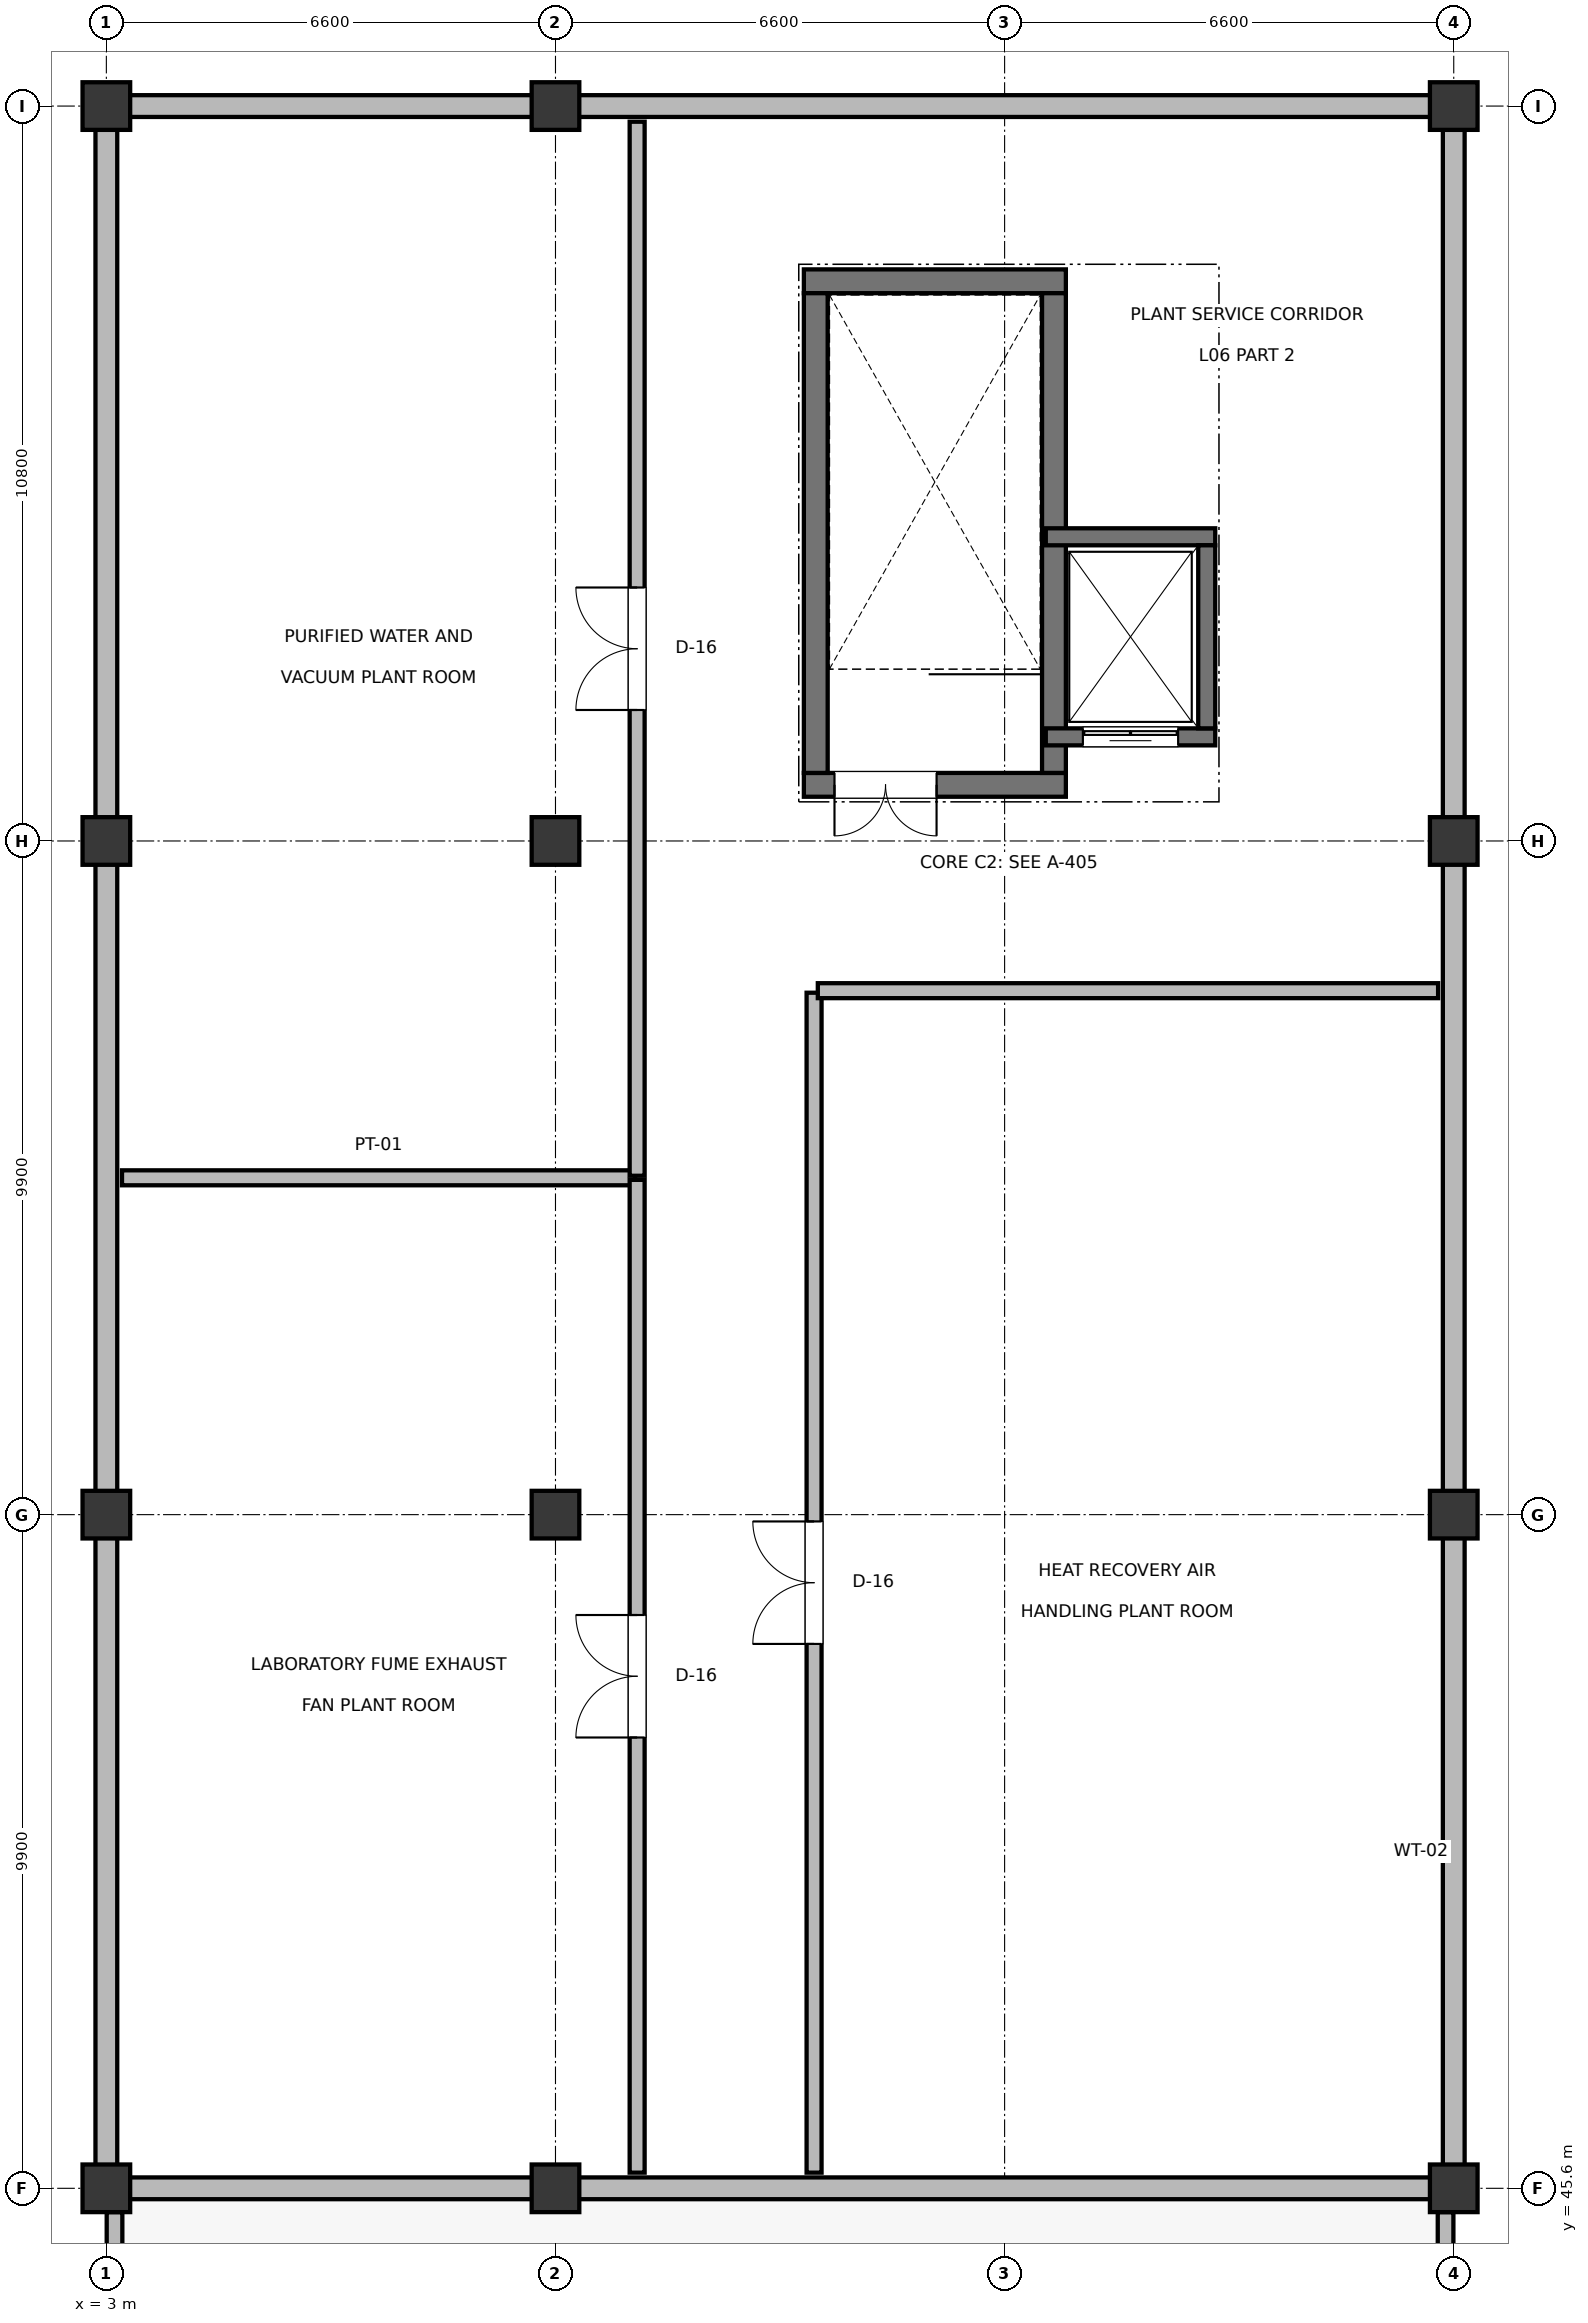
"""IFC4 building model, lengths in metres.
Left out: names, types, materials, properties, quantities, classifications, styles, units other than length and angle.
Written with IfcOpenShell. Run it as: python <this file> out.ifc"""

import sys

from ifc_helpers import new_model, si_unit, direction, frame, frame_2d, origin, origin_2d, place, context, subcontext, project, spatial, rectangle, extrude, element, fill, save


model = new_model("IFC4")
c1 = context("Model", 3, precision=1e-05, world=origin(), true_north=direction((0.0, 1.0)))
c2 = subcontext(c1, "Body", "Model", "MODEL_VIEW")
j1 = project(units=[si_unit("LENGTHUNIT", "METRE"), si_unit("PLANEANGLEUNIT", "RADIAN")], contexts=[c1])
p1 = place(None, origin())
s1 = spatial("IfcSite", under=j1, at=p1, CompositionType="ELEMENT")
p2 = place(p1, origin())
s2 = spatial("IfcBuilding", under=s1, at=p2, CompositionType="ELEMENT")
p3 = place(p2, frame((0.0, 0.0, 28.5)))
s3 = spatial("IfcBuildingStorey", under=s2, at=p3, CompositionType="ELEMENT", Elevation=28.5)
for number, where, z_axis, x_axis in (
    (1, (3.0, 45.6, 0.0), (0.0, 0.0, 1.0), (1.0, 0.0, 0.0)),
    (2, (3.0, 55.5, 0.0), (0.0, 0.0, 1.0), (1.0, 0.0, 0.0)),
    (3, (3.0, 65.4, 0.0), (0.0, 0.0, 1.0), (1.0, 0.0, 0.0)),
    (4, (3.0, 76.2, 0.0), (0.0, 0.0, 1.0), (1.0, 0.0, 0.0)),
    (5, (9.6, 45.6, 0.0), (0.0, 0.0, 1.0), (1.0, 0.0, 0.0)),
    (6, (9.6, 55.5, 0.0), (0.0, 0.0, 1.0), (1.0, 0.0, 0.0)),
    (7, (9.6, 65.4, 0.0), (0.0, 0.0, 1.0), (1.0, 0.0, 0.0)),
    (8, (9.6, 76.2, 0.0), (0.0, 0.0, 1.0), (1.0, 0.0, 0.0)),
    (9, (22.8, 45.6, 0.0), (0.0, 0.0, 1.0), (1.0, 0.0, 0.0)),
    (10, (22.8, 55.5, 0.0), (0.0, 0.0, 1.0), (1.0, 0.0, 0.0)),
    (11, (22.8, 65.4, 0.0), (0.0, 0.0, 1.0), (1.0, 0.0, 0.0)),
    (12, (22.8, 76.2, 0.0), (0.0, 0.0, 1.0), (1.0, 0.0, 0.0)),
):
    element("IfcColumn", number, at=place(p3, frame(where, z_axis=z_axis, x_axis=x_axis)), inside=s3, PredefinedType="COLUMN", context=c2, shape_type="SweptSolid", body=[
        extrude(rectangle(XDim=0.7, YDim=0.7, at=origin_2d()), origin(), (0.0, 0.0, 1.0), 4.5),
    ])
for number, where, z_axis, x_axis in (
    (13, (3.0, 45.935, 0.0), (0.0, 0.0, 1.0), (0.0, 1.0, 0.0)),
    (14, (3.0, 55.835, 0.0), (0.0, 0.0, 1.0), (0.0, 1.0, 0.0)),
):
    element("IfcWall", number, at=place(p3, frame(where, z_axis=z_axis, x_axis=x_axis)), inside=s3, PredefinedType="SOLIDWALL", context=c2, shape_type="SweptSolid", body=[
        extrude(rectangle(XDim=9.23, YDim=0.32, at=frame_2d((4.615, 0.0))), origin(), (0.0, 0.0, 1.0), 3.545),
    ])
p4 = place(p3, frame((3.0, 65.735, 0.0), z_axis=(0.0, 0.0, 1.0), x_axis=(0.0, 1.0, 0.0)))
e15 = element("IfcWall", 15, at=p4, inside=s3, PredefinedType="SOLIDWALL", context=c2, shape_type="SweptSolid", body=[
    extrude(rectangle(XDim=10.13, YDim=0.32, at=frame_2d((5.065, 0.0))), origin(), (0.0, 0.0, 1.0), 3.545),
])
for number, where, z_axis, x_axis in (
    (16, (22.8, 45.935, 0.0), (0.0, 0.0, 1.0), (0.0, 1.0, 0.0)),
    (17, (22.8, 55.835, 0.0), (0.0, 0.0, 1.0), (0.0, 1.0, 0.0)),
):
    element("IfcWall", number, at=place(p3, frame(where, z_axis=z_axis, x_axis=x_axis)), inside=s3, PredefinedType="SOLIDWALL", context=c2, shape_type="SweptSolid", body=[
        extrude(rectangle(XDim=9.23, YDim=0.32, at=frame_2d((4.615, 0.0))), origin(), (0.0, 0.0, 1.0), 3.395),
    ])
p5 = place(p3, frame((22.8, 65.735, 0.0), z_axis=(0.0, 0.0, 1.0), x_axis=(0.0, 1.0, 0.0)))
e18 = element("IfcWall", 18, at=p5, inside=s3, PredefinedType="SOLIDWALL", context=c2, shape_type="SweptSolid", body=[
    extrude(rectangle(XDim=10.13, YDim=0.32, at=frame_2d((5.065, 0.0))), origin(), (0.0, 0.0, 1.0), 3.395),
])
p6 = place(p3, frame((3.335, 76.2, 0.0), z_axis=(0.0, 0.0, 1.0), x_axis=(1.0, 0.0, 0.0)))
e19 = element("IfcWall", 19, at=p6, inside=s3, PredefinedType="SOLIDWALL", context=c2, shape_type="SweptSolid", body=[
    extrude(rectangle(XDim=19.13, YDim=0.32, at=frame_2d((9.565, 0.0))), origin(), (0.0, 0.0, 1.0), 3.425),
])
p7 = place(p3, frame((3.335, 45.6, 0.0), z_axis=(0.0, 0.0, 1.0), x_axis=(1.0, 0.0, 0.0)))
e20 = element("IfcWall", 20, at=p7, inside=s3, PredefinedType="SOLIDWALL", context=c2, shape_type="SweptSolid", body=[
    extrude(rectangle(XDim=19.13, YDim=0.32, at=frame_2d((9.565, 0.0))), origin(), (0.0, 0.0, 1.0), 3.445),
])
for number, where, z_axis, x_axis in (
    (21, (3.12, 30.35, 0.0), (0.0, 0.0, 1.0), (0.0, 1.0, 0.0)),
    (22, (22.68, 30.35, 0.0), (0.0, 0.0, 1.0), (0.0, 1.0, 0.0)),
):
    element("IfcWall", number, at=place(p3, frame(where, z_axis=z_axis, x_axis=x_axis)), inside=s3, PredefinedType="PARAPET", context=c2, shape_type="SweptSolid", body=[
        extrude(rectangle(XDim=14.9, YDim=0.23, at=frame_2d((7.45, 0.0))), origin(), (0.0, 0.0, 1.0), 1.05),
    ])
p8 = place(p3, frame((13.25, 66.225, 0.0), z_axis=(0.0, 0.0, 1.0), x_axis=(1.0, 0.0, 0.0)))
e23 = element("IfcWall", 23, at=p8, inside=s3, PredefinedType="SHEAR", context=c2, shape_type="SweptSolid", body=[
    extrude(rectangle(XDim=3.85, YDim=0.35, at=frame_2d((1.925, 0.0))), origin(), (0.0, 0.0, 1.0), 4.28),
])
p9 = place(p8, frame((0.45, 0.0, 0.0)))
e24 = element("IfcOpeningElement", 24, at=p9, cuts=e23, PredefinedType="OPENING", context=c2, shape_type="SweptSolid", body=[
    extrude(rectangle(XDim=1.5, YDim=2.2, at=frame_2d((0.75, 1.1))), frame((0.0, 0.185, 0.0), z_axis=(0.0, -1.0, 0.0), x_axis=(1.0, 0.0, 0.0)), (0.0, 0.0, 1.0), 0.37),
])
p10 = place(p3, frame((13.25, 73.625, 0.0), z_axis=(0.0, 0.0, 1.0), x_axis=(1.0, 0.0, 0.0)))
e25 = element("IfcWall", 25, at=p10, inside=s3, PredefinedType="SHEAR", context=c2, shape_type="SweptSolid", body=[
    extrude(rectangle(XDim=3.85, YDim=0.35, at=frame_2d((1.925, 0.0))), origin(), (0.0, 0.0, 1.0), 4.28),
])
for number, where, z_axis, x_axis in (
    (26, (13.425, 66.4, 0.0), (0.0, 0.0, 1.0), (0.0, 1.0, 0.0)),
    (27, (16.925, 66.4, 0.0), (0.0, 0.0, 1.0), (0.0, 1.0, 0.0)),
):
    element("IfcWall", number, at=place(p3, frame(where, z_axis=z_axis, x_axis=x_axis)), inside=s3, PredefinedType="SHEAR", context=c2, shape_type="SweptSolid", body=[
        extrude(rectangle(XDim=7.05, YDim=0.35, at=frame_2d((3.525, 0.0))), origin(), (0.0, 0.0, 1.0), 4.28),
    ])
p11 = place(p3, frame((16.805, 66.93, 0.0), z_axis=(0.0, 0.0, 1.0), x_axis=(1.0, 0.0, 0.0)))
e28 = element("IfcWall", 28, at=p11, inside=s3, PredefinedType="SHEAR", context=c2, shape_type="SweptSolid", body=[
    extrude(rectangle(XDim=2.49, YDim=0.25, at=frame_2d((1.245, 0.0))), origin(), (0.0, 0.0, 1.0), 4.26),
])
p12 = place(p11, frame((0.545, 0.0, 0.0)))
e29 = element("IfcOpeningElement", 29, at=p12, cuts=e28, PredefinedType="OPENING", context=c2, shape_type="SweptSolid", body=[
    extrude(rectangle(XDim=1.4, YDim=2.3, at=frame_2d((0.7, 1.15))), frame((0.0, 0.135, 0.0), z_axis=(0.0, -1.0, 0.0), x_axis=(1.0, 0.0, 0.0)), (0.0, 0.0, 1.0), 0.27),
])
p13 = place(p3, frame((16.805, 69.87, 0.0), z_axis=(0.0, 0.0, 1.0), x_axis=(1.0, 0.0, 0.0)))
e30 = element("IfcWall", 30, at=p13, inside=s3, PredefinedType="SHEAR", context=c2, shape_type="SweptSolid", body=[
    extrude(rectangle(XDim=2.49, YDim=0.25, at=frame_2d((1.245, 0.0))), origin(), (0.0, 0.0, 1.0), 4.26),
])
p14 = place(p3, frame((19.17, 67.055, 0.0), z_axis=(0.0, 0.0, 1.0), x_axis=(0.0, 1.0, 0.0)))
e31 = element("IfcWall", 31, at=p14, inside=s3, PredefinedType="SHEAR", context=c2, shape_type="SweptSolid", body=[
    extrude(rectangle(XDim=2.69, YDim=0.25, at=frame_2d((1.345, 0.0))), origin(), (0.0, 0.0, 1.0), 4.26),
])
p15 = place(p3, frame((3.23, 60.45, 0.0), z_axis=(0.0, 0.0, 1.0), x_axis=(1.0, 0.0, 0.0)))
e32 = element("IfcWall", 32, at=p15, inside=s3, PredefinedType="PARTITIONING", context=c2, shape_type="SweptSolid", body=[
    extrude(rectangle(XDim=7.54, YDim=0.22, at=frame_2d((3.77, 0.0))), origin(), (0.0, 0.0, 1.0), 3.395),
])
p16 = place(p3, frame((10.8, 45.83, 0.0), z_axis=(0.0, 0.0, 1.0), x_axis=(0.0, 1.0, 0.0)))
e33 = element("IfcWall", 33, at=p16, inside=s3, PredefinedType="PARTITIONING", context=c2, shape_type="SweptSolid", body=[
    extrude(rectangle(XDim=14.59, YDim=0.22, at=frame_2d((7.295, 0.0))), origin(), (0.0, 0.0, 1.0), 3.445),
])
p17 = place(p16, frame((6.395, 0.0, 0.0)))
e34 = element("IfcOpeningElement", 34, at=p17, cuts=e33, PredefinedType="OPENING", context=c2, shape_type="SweptSolid", body=[
    extrude(rectangle(XDim=1.8, YDim=2.4, at=frame_2d((0.9, 1.2))), frame((0.0, 0.12, 0.0), z_axis=(0.0, -1.0, 0.0), x_axis=(1.0, 0.0, 0.0)), (0.0, 0.0, 1.0), 0.24),
])
p18 = place(p3, frame((13.4, 45.83, 0.0), z_axis=(0.0, 0.0, 1.0), x_axis=(0.0, 1.0, 0.0)))
e35 = element("IfcWall", 35, at=p18, inside=s3, PredefinedType="PARTITIONING", context=c2, shape_type="SweptSolid", body=[
    extrude(rectangle(XDim=17.34, YDim=0.22, at=frame_2d((8.67, 0.0))), origin(), (0.0, 0.0, 1.0), 3.445),
])
p19 = place(p18, frame((7.77, 0.0, 0.0)))
e36 = element("IfcOpeningElement", 36, at=p19, cuts=e35, PredefinedType="OPENING", context=c2, shape_type="SweptSolid", body=[
    extrude(rectangle(XDim=1.8, YDim=2.4, at=frame_2d((0.9, 1.2))), frame((0.0, 0.12, 0.0), z_axis=(0.0, -1.0, 0.0), x_axis=(1.0, 0.0, 0.0)), (0.0, 0.0, 1.0), 0.24),
])
p20 = place(p3, frame((13.455, 63.2, 0.0), z_axis=(0.0, 0.0, 1.0), x_axis=(1.0, 0.0, 0.0)))
e37 = element("IfcWall", 37, at=p20, inside=s3, PredefinedType="PARTITIONING", context=c2, shape_type="SweptSolid", body=[
    extrude(rectangle(XDim=9.115, YDim=0.22, at=frame_2d((4.558, 0.0))), origin(), (0.0, 0.0, 1.0), 3.395),
])
p21 = place(p3, frame((10.8, 60.48, 0.0), z_axis=(0.0, 0.0, 1.0), x_axis=(0.0, 1.0, 0.0)))
e38 = element("IfcWall", 38, at=p21, inside=s3, PredefinedType="PARTITIONING", context=c2, shape_type="SweptSolid", body=[
    extrude(rectangle(XDim=15.49, YDim=0.22, at=frame_2d((7.745, 0.0))), origin(), (0.0, 0.0, 1.0), 3.445),
])
p22 = place(p21, frame((6.845, 0.0, 0.0)))
e39 = element("IfcOpeningElement", 39, at=p22, cuts=e38, PredefinedType="OPENING", context=c2, shape_type="SweptSolid", body=[
    extrude(rectangle(XDim=1.8, YDim=2.4, at=frame_2d((0.9, 1.2))), frame((0.0, 0.12, 0.0), z_axis=(0.0, -1.0, 0.0), x_axis=(1.0, 0.0, 0.0)), (0.0, 0.0, 1.0), 0.24),
])
p23 = place(p9, frame((1.5, 0.0, 0.0), z_axis=(0.0, 0.0, 1.0), x_axis=(-1.0, 0.0, 0.0)))
e40 = element("IfcDoor", 40, at=p23, inside=s3, OperationType="DOUBLE_DOOR_SINGLE_SWING", PredefinedType="DOOR", context=c2, shape_type="SweptSolid", body=[
    extrude(rectangle(XDim=1.5, YDim=2.2, at=frame_2d((0.75, 1.1))), frame((0.0, 0.025, 0.0), z_axis=(0.0, -1.0, 0.0), x_axis=(1.0, 0.0, 0.0)), (0.0, 0.0, 1.0), 0.05),
])
fill(e24, e40)
p24 = place(p12, frame((1.4, 0.0, 0.0), z_axis=(0.0, 0.0, 1.0), x_axis=(-1.0, 0.0, 0.0)))
e41 = element("IfcDoor", 41, at=p24, inside=s3, OperationType="DOUBLE_DOOR_SLIDING", PredefinedType="DOOR", context=c2, shape_type="SweptSolid", body=[
    extrude(rectangle(XDim=1.4, YDim=2.3, at=frame_2d((0.7, 1.15))), frame((0.0, 0.025, 0.0), z_axis=(0.0, -1.0, 0.0), x_axis=(1.0, 0.0, 0.0)), (0.0, 0.0, 1.0), 0.05),
])
fill(e29, e41)
p25 = place(p17, origin())
e42 = element("IfcDoor", 42, at=p25, inside=s3, OperationType="DOUBLE_DOOR_SINGLE_SWING", PredefinedType="DOOR", context=c2, shape_type="SweptSolid", body=[
    extrude(rectangle(XDim=1.8, YDim=2.4, at=frame_2d((0.9, 1.2))), frame((0.0, 0.025, 0.0), z_axis=(0.0, -1.0, 0.0), x_axis=(1.0, 0.0, 0.0)), (0.0, 0.0, 1.0), 0.05),
])
fill(e34, e42)
p26 = place(p19, origin())
e43 = element("IfcDoor", 43, at=p26, inside=s3, OperationType="DOUBLE_DOOR_SINGLE_SWING", PredefinedType="DOOR", context=c2, shape_type="SweptSolid", body=[
    extrude(rectangle(XDim=1.8, YDim=2.4, at=frame_2d((0.9, 1.2))), frame((0.0, 0.025, 0.0), z_axis=(0.0, -1.0, 0.0), x_axis=(1.0, 0.0, 0.0)), (0.0, 0.0, 1.0), 0.05),
])
fill(e36, e43)
p27 = place(p22, origin())
e44 = element("IfcDoor", 44, at=p27, inside=s3, OperationType="DOUBLE_DOOR_SINGLE_SWING", PredefinedType="DOOR", context=c2, shape_type="SweptSolid", body=[
    extrude(rectangle(XDim=1.8, YDim=2.4, at=frame_2d((0.9, 1.2))), frame((0.0, 0.025, 0.0), z_axis=(0.0, -1.0, 0.0), x_axis=(1.0, 0.0, 0.0)), (0.0, 0.0, 1.0), 0.05),
])
fill(e39, e44)
save(model, sys.argv[1])
